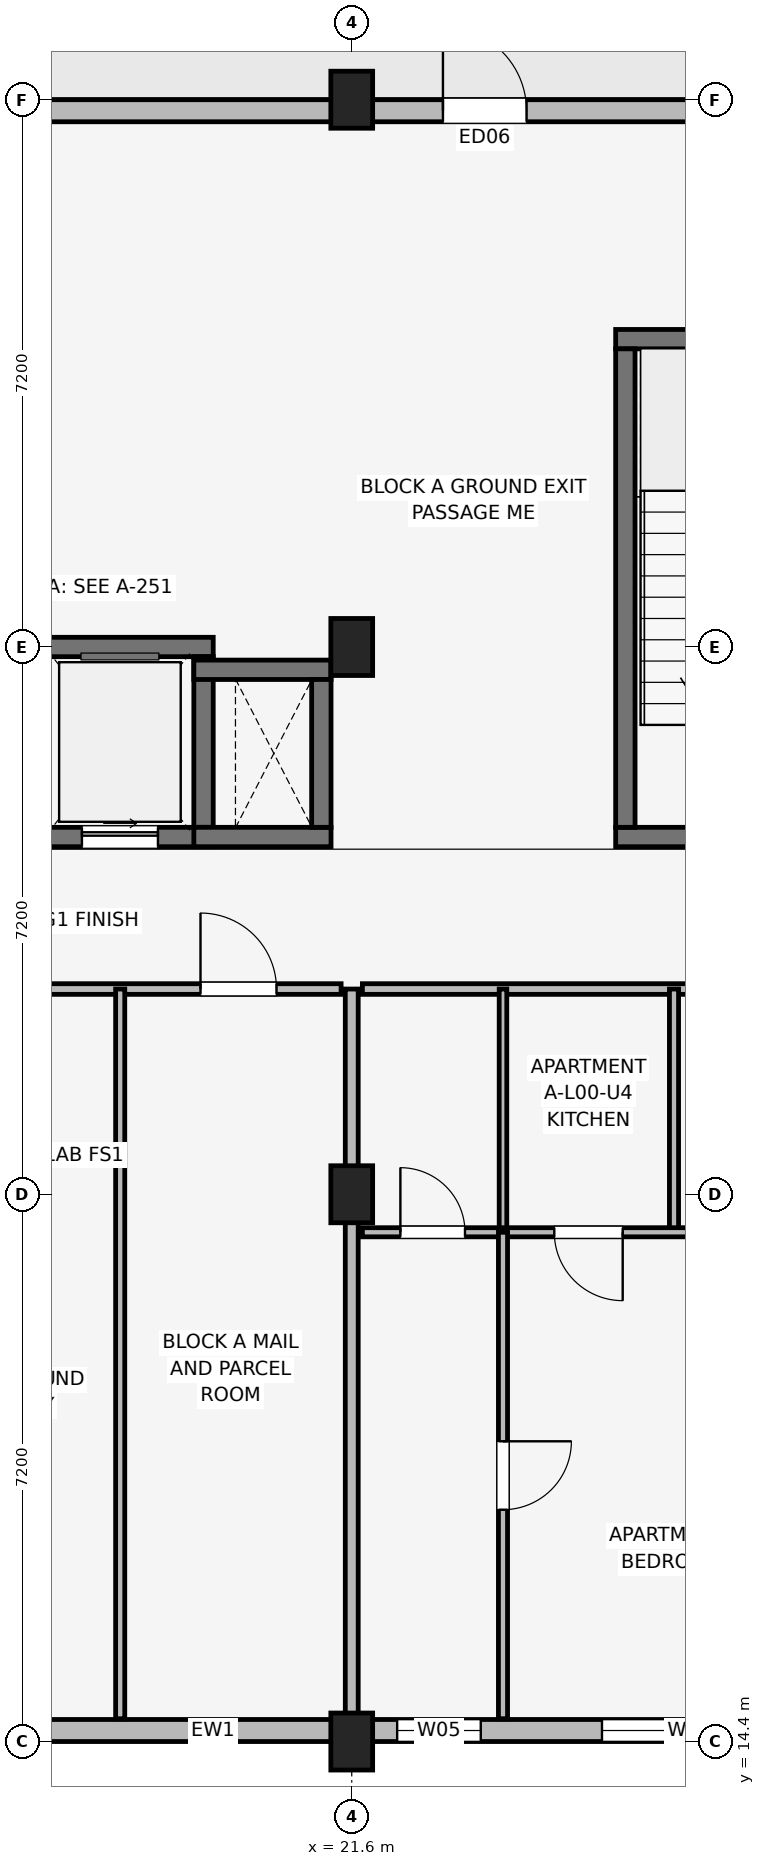
"""IFC4 building model, lengths in metres.
Left out: names, types, materials, properties, quantities, classifications, styles, units other than length and angle.
Written with IfcOpenShell. Run it as: python <this file> out.ifc"""

import sys

from ifc_helpers import new_model, si_unit, direction, frame, frame_2d, origin, origin_2d, place, context, subcontext, project, spatial, rectangle, extrude, element, fill, save


model = new_model("IFC4")
c1 = context("Model", 3, precision=1e-05, world=origin(), true_north=direction((0.0, 1.0)))
c2 = subcontext(c1, "Body", "Model", "MODEL_VIEW")
j1 = project(units=[si_unit("LENGTHUNIT", "METRE"), si_unit("PLANEANGLEUNIT", "RADIAN")], contexts=[c1])
p1 = place(None, origin())
s1 = spatial("IfcSite", under=j1, at=p1, CompositionType="ELEMENT")
p2 = place(p1, origin())
s2 = spatial("IfcBuilding", under=s1, at=p2, CompositionType="ELEMENT")
p3 = place(p2, origin())
s3 = spatial("IfcBuildingStorey", under=s2, at=p3, CompositionType="ELEMENT", Elevation=0.0)
for number, where, z_axis, x_axis in (
    (1, (21.6, 14.4, 0.0), (0.0, 0.0, 1.0), (1.0, 0.0, 0.0)),
    (2, (21.6, 21.6, 0.0), (0.0, 0.0, 1.0), (1.0, 0.0, 0.0)),
    (3, (21.6, 28.8, 0.0), (0.0, 0.0, 1.0), (1.0, 0.0, 0.0)),
    (4, (21.6, 36.0, 0.0), (0.0, 0.0, 1.0), (1.0, 0.0, 0.0)),
):
    element("IfcColumn", number, at=place(p3, frame(where, z_axis=z_axis, x_axis=x_axis)), inside=s3, PredefinedType="COLUMN", context=c2, shape_type="SweptSolid", body=[
        extrude(rectangle(XDim=0.55, YDim=0.75, at=origin_2d()), origin(), (0.0, 0.0, 1.0), 4.5),
    ])
p4 = place(p3, frame((25.073, 26.3, 0.0), z_axis=(0.0, 0.0, 1.0), x_axis=(1.0, 0.0, 0.0)))
e5 = element("IfcWall", 5, at=p4, inside=s3, PredefinedType="SHEAR", context=c2, shape_type="SweptSolid", body=[
    extrude(rectangle(XDim=3.305, YDim=0.255, at=frame_2d((1.652, 0.0))), origin(), (0.0, 0.0, 1.0), 4.5),
])
p5 = place(p4, frame((1.127, 0.0, 0.0)))
e6 = element("IfcOpeningElement", 6, at=p5, cuts=e5, PredefinedType="OPENING", context=c2, shape_type="SweptSolid", body=[
    extrude(rectangle(XDim=1.05, YDim=2.12, at=frame_2d((0.525, 1.06))), frame((0.0, 0.137, 0.0), z_axis=(0.0, -1.0, 0.0), x_axis=(1.0, 0.0, 0.0)), (0.0, 0.0, 1.0), 0.275),
])
p6 = place(p3, frame((25.073, 32.85, 0.0), z_axis=(0.0, 0.0, 1.0), x_axis=(1.0, 0.0, 0.0)))
e7 = element("IfcWall", 7, at=p6, inside=s3, PredefinedType="SHEAR", context=c2, shape_type="SweptSolid", body=[
    extrude(rectangle(XDim=3.305, YDim=0.255, at=frame_2d((1.652, 0.0))), origin(), (0.0, 0.0, 1.0), 4.5),
])
p7 = place(p3, frame((25.2, 26.427, 0.0), z_axis=(0.0, 0.0, 1.0), x_axis=(0.0, 1.0, 0.0)))
e8 = element("IfcWall", 8, at=p7, inside=s3, PredefinedType="SHEAR", context=c2, shape_type="SweptSolid", body=[
    extrude(rectangle(XDim=6.295, YDim=0.255, at=frame_2d((3.147, 0.0))), origin(), (0.0, 0.0, 1.0), 4.5),
])
p8 = place(p3, frame((17.323, 26.3, 0.0), z_axis=(0.0, 0.0, 1.0), x_axis=(1.0, 0.0, 0.0)))
e9 = element("IfcWall", 9, at=p8, inside=s3, PredefinedType="SHEAR", context=c2, shape_type="SweptSolid", body=[
    extrude(rectangle(XDim=2.455, YDim=0.255, at=frame_2d((1.228, 0.0))), origin(), (0.0, 0.0, 1.0), 4.5),
])
p9 = place(p8, frame((0.728, 0.0, 0.0)))
e10 = element("IfcOpeningElement", 10, at=p9, cuts=e9, PredefinedType="OPENING", context=c2, shape_type="SweptSolid", body=[
    extrude(rectangle(XDim=1.0, YDim=2.15, at=frame_2d((0.5, 1.075))), frame((0.0, 0.137, 0.0), z_axis=(0.0, -1.0, 0.0), x_axis=(1.0, 0.0, 0.0)), (0.0, 0.0, 1.0), 0.275),
])
p10 = place(p3, frame((17.323, 28.8, 0.0), z_axis=(0.0, 0.0, 1.0), x_axis=(1.0, 0.0, 0.0)))
e11 = element("IfcWall", 11, at=p10, inside=s3, PredefinedType="SHEAR", context=c2, shape_type="SweptSolid", body=[
    extrude(rectangle(XDim=2.455, YDim=0.255, at=frame_2d((1.228, 0.0))), origin(), (0.0, 0.0, 1.0), 4.5),
])
p11 = place(p3, frame((19.65, 26.427, 0.0), z_axis=(0.0, 0.0, 1.0), x_axis=(0.0, 1.0, 0.0)))
e12 = element("IfcWall", 12, at=p11, inside=s3, PredefinedType="SHEAR", context=c2, shape_type="SweptSolid", body=[
    extrude(rectangle(XDim=2.245, YDim=0.255, at=frame_2d((1.123, 0.0))), origin(), (0.0, 0.0, 1.0), 4.5),
])
for number, where, z_axis, x_axis in (
    (13, (19.522, 26.3, 0.0), (0.0, 0.0, 1.0), (1.0, 0.0, 0.0)),
    (14, (19.522, 28.5, 0.0), (0.0, 0.0, 1.0), (1.0, 0.0, 0.0)),
):
    element("IfcWall", number, at=place(p3, frame(where, z_axis=z_axis, x_axis=x_axis)), inside=s3, PredefinedType="SHEAR", context=c2, shape_type="SweptSolid", body=[
        extrude(rectangle(XDim=1.805, YDim=0.255, at=frame_2d((0.902, 0.0))), origin(), (0.0, 0.0, 1.0), 4.5),
    ])
p12 = place(p3, frame((21.2, 26.427, 0.0), z_axis=(0.0, 0.0, 1.0), x_axis=(0.0, 1.0, 0.0)))
e15 = element("IfcWall", 15, at=p12, inside=s3, PredefinedType="SHEAR", context=c2, shape_type="SweptSolid", body=[
    extrude(rectangle(XDim=1.945, YDim=0.255, at=frame_2d((0.973, 0.0))), origin(), (0.0, 0.0, 1.0), 4.5),
])
p13 = place(p3, frame((3.4, 14.545, 0.0), z_axis=(0.0, 0.0, 1.0), x_axis=(1.0, 0.0, 0.0)))
e16 = element("IfcWall", 16, at=p13, inside=s3, PredefinedType="SOLIDWALL", context=c2, shape_type="SweptSolid", body=[
    extrude(rectangle(XDim=29.2, YDim=0.29, at=frame_2d((14.6, 0.0))), origin(), (0.0, 0.0, 1.0), 3.53),
])
p14 = place(p13, frame((13.95, 0.0, 0.0), z_axis=(0.0, 0.0, 1.0), x_axis=(-1.0, 0.0, 0.0)))
e17 = element("IfcOpeningElement", 17, at=p14, cuts=e16, PredefinedType="OPENING", context=c2, shape_type="SweptSolid", body=[
    extrude(rectangle(XDim=1.8, YDim=2.4, at=frame_2d((0.9, 1.2))), frame((0.0, 0.155, 0.0), z_axis=(0.0, -1.0, 0.0), x_axis=(1.0, 0.0, 0.0)), (0.0, 0.0, 1.0), 0.31),
])
p15 = place(p13, frame((1.502, 0.0, 0.75)))
e18 = element("IfcOpeningElement", 18, at=p15, cuts=e16, PredefinedType="OPENING", context=c2, shape_type="SweptSolid", body=[
    extrude(rectangle(XDim=0.85, YDim=1.4, at=frame_2d((0.425, 0.7))), frame((0.0, 0.155, 0.0), z_axis=(0.0, -1.0, 0.0), x_axis=(1.0, 0.0, 0.0)), (0.0, 0.0, 1.0), 0.31),
])
p16 = place(p13, frame((6.4, 0.0, 0.7)))
e19 = element("IfcOpeningElement", 19, at=p16, cuts=e16, PredefinedType="OPENING", context=c2, shape_type="SweptSolid", body=[
    extrude(rectangle(XDim=2.0, YDim=1.65, at=frame_2d((1.0, 0.825))), frame((0.0, 0.155, 0.0), z_axis=(0.0, -1.0, 0.0), x_axis=(1.0, 0.0, 0.0)), (0.0, 0.0, 1.0), 0.31),
])
p17 = place(p13, frame((18.798, 0.0, 0.75)))
e20 = element("IfcOpeningElement", 20, at=p17, cuts=e16, PredefinedType="OPENING", context=c2, shape_type="SweptSolid", body=[
    extrude(rectangle(XDim=1.1, YDim=1.5, at=frame_2d((0.55, 0.75))), frame((0.0, 0.155, 0.0), z_axis=(0.0, -1.0, 0.0), x_axis=(1.0, 0.0, 0.0)), (0.0, 0.0, 1.0), 0.31),
])
p18 = place(p13, frame((21.492, 0.0, 0.7)))
e21 = element("IfcOpeningElement", 21, at=p18, cuts=e16, PredefinedType="OPENING", context=c2, shape_type="SweptSolid", body=[
    extrude(rectangle(XDim=2.3, YDim=1.65, at=frame_2d((1.15, 0.825))), frame((0.0, 0.155, 0.0), z_axis=(0.0, -1.0, 0.0), x_axis=(1.0, 0.0, 0.0)), (0.0, 0.0, 1.0), 0.31),
])
p19 = place(p13, frame((25.877, 0.0, 0.75)))
e22 = element("IfcOpeningElement", 22, at=p19, cuts=e16, PredefinedType="OPENING", context=c2, shape_type="SweptSolid", body=[
    extrude(rectangle(XDim=1.34, YDim=1.55, at=frame_2d((0.67, 0.775))), frame((0.0, 0.155, 0.0), z_axis=(0.0, -1.0, 0.0), x_axis=(1.0, 0.0, 0.0)), (0.0, 0.0, 1.0), 0.31),
])
p20 = place(p3, frame((32.6, 35.855, 0.0), z_axis=(0.0, 0.0, 1.0), x_axis=(-1.0, 0.0, 0.0)))
e23 = element("IfcWall", 23, at=p20, inside=s3, PredefinedType="SOLIDWALL", context=c2, shape_type="SweptSolid", body=[
    extrude(rectangle(XDim=29.2, YDim=0.29, at=frame_2d((14.6, 0.0))), origin(), (0.0, 0.0, 1.0), 3.53),
])
p21 = place(p20, frame((20.4, 0.0, 0.0), z_axis=(0.0, 0.0, 1.0), x_axis=(-1.0, 0.0, 0.0)))
e24 = element("IfcOpeningElement", 24, at=p21, cuts=e23, PredefinedType="OPENING", context=c2, shape_type="SweptSolid", body=[
    extrude(rectangle(XDim=1.1, YDim=2.15, at=frame_2d((0.55, 1.075))), frame((0.0, 0.155, 0.0), z_axis=(0.0, -1.0, 0.0), x_axis=(1.0, 0.0, 0.0)), (0.0, 0.0, 1.0), 0.31),
])
p22 = place(p20, frame((9.8, 0.0, 0.0), z_axis=(0.0, 0.0, 1.0), x_axis=(-1.0, 0.0, 0.0)))
e25 = element("IfcOpeningElement", 25, at=p22, cuts=e23, PredefinedType="OPENING", context=c2, shape_type="SweptSolid", body=[
    extrude(rectangle(XDim=1.1, YDim=2.15, at=frame_2d((0.55, 1.075))), frame((0.0, 0.155, 0.0), z_axis=(0.0, -1.0, 0.0), x_axis=(1.0, 0.0, 0.0)), (0.0, 0.0, 1.0), 0.31),
])
p23 = place(p20, frame((0.897, 0.0, 0.7)))
e26 = element("IfcOpeningElement", 26, at=p23, cuts=e23, PredefinedType="OPENING", context=c2, shape_type="SweptSolid", body=[
    extrude(rectangle(XDim=1.86, YDim=1.6, at=frame_2d((0.93, 0.8))), frame((0.0, 0.155, 0.0), z_axis=(0.0, -1.0, 0.0), x_axis=(1.0, 0.0, 0.0)), (0.0, 0.0, 1.0), 0.31),
])
p24 = place(p20, frame((26.373, 0.0, 0.7)))
e27 = element("IfcOpeningElement", 27, at=p24, cuts=e23, PredefinedType="OPENING", context=c2, shape_type="SweptSolid", body=[
    extrude(rectangle(XDim=2.0, YDim=1.65, at=frame_2d((1.0, 0.825))), frame((0.0, 0.155, 0.0), z_axis=(0.0, -1.0, 0.0), x_axis=(1.0, 0.0, 0.0)), (0.0, 0.0, 1.0), 0.31),
])
p25 = place(p3, frame((14.54, 24.3, 0.0), z_axis=(0.0, 0.0, 1.0), x_axis=(1.0, 0.0, 0.0)))
e28 = element("IfcWall", 28, at=p25, inside=s3, PredefinedType="PARTITIONING", context=c2, shape_type="SweptSolid", body=[
    extrude(rectangle(XDim=6.92, YDim=0.14, at=frame_2d((3.46, 0.0))), origin(), (0.0, 0.0, 1.0), 3.15),
])
p26 = place(p25, frame((2.65, 0.0, 0.0), z_axis=(0.0, 0.0, 1.0), x_axis=(-1.0, 0.0, 0.0)))
e29 = element("IfcOpeningElement", 29, at=p26, cuts=e28, PredefinedType="OPENING", context=c2, shape_type="SweptSolid", body=[
    extrude(rectangle(XDim=1.4, YDim=2.22, at=frame_2d((0.7, 1.11))), frame((0.0, 0.08, 0.0), z_axis=(0.0, -1.0, 0.0), x_axis=(1.0, 0.0, 0.0)), (0.0, 0.0, 1.0), 0.16),
])
p27 = place(p25, frame((5.07, 0.0, 0.0)))
e30 = element("IfcOpeningElement", 30, at=p27, cuts=e28, PredefinedType="OPENING", context=c2, shape_type="SweptSolid", body=[
    extrude(rectangle(XDim=1.0, YDim=2.12, at=frame_2d((0.5, 1.06))), frame((0.0, 0.08, 0.0), z_axis=(0.0, -1.0, 0.0), x_axis=(1.0, 0.0, 0.0)), (0.0, 0.0, 1.0), 0.16),
])
p28 = place(p3, frame((18.554, 14.7, 0.0), z_axis=(0.0, 0.0, 1.0), x_axis=(0.0, 1.0, 0.0)))
e31 = element("IfcWall", 31, at=p28, inside=s3, PredefinedType="PARTITIONING", context=c2, shape_type="SweptSolid", body=[
    extrude(rectangle(XDim=9.6, YDim=0.12, at=frame_2d((4.8, 0.0))), origin(), (0.0, 0.0, 1.0), 3.15),
])
p29 = place(p3, frame((21.6, 14.7, 0.0), z_axis=(0.0, 0.0, 1.0), x_axis=(0.0, 1.0, 0.0)))
e32 = element("IfcWall", 32, at=p29, inside=s3, PredefinedType="PARTITIONING", context=c2, shape_type="SweptSolid", body=[
    extrude(rectangle(XDim=9.6, YDim=0.17, at=frame_2d((4.8, 0.0))), origin(), (0.0, 0.0, 1.0), 3.15),
])
p30 = place(p3, frame((21.74, 24.3, 0.0), z_axis=(0.0, 0.0, 1.0), x_axis=(1.0, 0.0, 0.0)))
e33 = element("IfcWall", 33, at=p30, inside=s3, PredefinedType="PARTITIONING", context=c2, shape_type="SweptSolid", body=[
    extrude(rectangle(XDim=6.92, YDim=0.14, at=frame_2d((3.46, 0.0))), origin(), (0.0, 0.0, 1.0), 3.15),
])
p31 = place(p30, frame((6.0, 0.0, 0.0), z_axis=(0.0, 0.0, 1.0), x_axis=(-1.0, 0.0, 0.0)))
e34 = element("IfcOpeningElement", 34, at=p31, cuts=e33, PredefinedType="OPENING", context=c2, shape_type="SweptSolid", body=[
    extrude(rectangle(XDim=0.98, YDim=2.1, at=frame_2d((0.49, 1.05))), frame((0.0, 0.08, 0.0), z_axis=(0.0, -1.0, 0.0), x_axis=(1.0, 0.0, 0.0)), (0.0, 0.0, 1.0), 0.16),
])
p32 = place(p3, frame((23.59, 21.1, 0.0), z_axis=(0.0, 0.0, 1.0), x_axis=(0.0, 1.0, 0.0)))
e35 = element("IfcWall", 35, at=p32, inside=s3, PredefinedType="PARTITIONING", context=c2, shape_type="SweptSolid", body=[
    extrude(rectangle(XDim=3.2, YDim=0.1, at=frame_2d((1.6, 0.0))), origin(), (0.0, 0.0, 1.0), 3.15),
])
p33 = place(p3, frame((25.84, 21.1, 0.0), z_axis=(0.0, 0.0, 1.0), x_axis=(0.0, 1.0, 0.0)))
e36 = element("IfcWall", 36, at=p33, inside=s3, PredefinedType="PARTITIONING", context=c2, shape_type="SweptSolid", body=[
    extrude(rectangle(XDim=3.2, YDim=0.12, at=frame_2d((1.6, 0.0))), origin(), (0.0, 0.0, 1.0), 3.15),
])
p34 = place(p3, frame((21.74, 21.1, 0.0), z_axis=(0.0, 0.0, 1.0), x_axis=(1.0, 0.0, 0.0)))
e37 = element("IfcWall", 37, at=p34, inside=s3, PredefinedType="PARTITIONING", context=c2, shape_type="SweptSolid", body=[
    extrude(rectangle(XDim=6.92, YDim=0.12, at=frame_2d((3.46, 0.0))), origin(), (0.0, 0.0, 1.0), 3.15),
])
p35 = place(p34, frame((0.5, 0.0, 0.0)))
e38 = element("IfcOpeningElement", 38, at=p35, cuts=e37, PredefinedType="OPENING", context=c2, shape_type="SweptSolid", body=[
    extrude(rectangle(XDim=0.85, YDim=2.08, at=frame_2d((0.425, 1.04))), frame((0.0, 0.07, 0.0), z_axis=(0.0, -1.0, 0.0), x_axis=(1.0, 0.0, 0.0)), (0.0, 0.0, 1.0), 0.14),
])
p36 = place(p34, frame((3.425, 0.0, 0.0), z_axis=(0.0, 0.0, 1.0), x_axis=(-1.0, 0.0, 0.0)))
e39 = element("IfcOpeningElement", 39, at=p36, cuts=e37, PredefinedType="OPENING", context=c2, shape_type="SweptSolid", body=[
    extrude(rectangle(XDim=0.9, YDim=2.08, at=frame_2d((0.45, 1.04))), frame((0.0, 0.07, 0.0), z_axis=(0.0, -1.0, 0.0), x_axis=(1.0, 0.0, 0.0)), (0.0, 0.0, 1.0), 0.14),
])
p37 = place(p34, frame((5.035, 0.0, 0.0)))
e40 = element("IfcOpeningElement", 40, at=p37, cuts=e37, PredefinedType="OPENING", context=c2, shape_type="SweptSolid", body=[
    extrude(rectangle(XDim=0.95, YDim=2.08, at=frame_2d((0.475, 1.04))), frame((0.0, 0.07, 0.0), z_axis=(0.0, -1.0, 0.0), x_axis=(1.0, 0.0, 0.0)), (0.0, 0.0, 1.0), 0.14),
])
p38 = place(p3, frame((23.59, 14.7, 0.0), z_axis=(0.0, 0.0, 1.0), x_axis=(0.0, 1.0, 0.0)))
e41 = element("IfcWall", 41, at=p38, inside=s3, PredefinedType="PARTITIONING", context=c2, shape_type="SweptSolid", body=[
    extrude(rectangle(XDim=6.4, YDim=0.12, at=frame_2d((3.2, 0.0))), origin(), (0.0, 0.0, 1.0), 3.15),
])
p39 = place(p38, frame((3.65, 0.0, 0.0), z_axis=(0.0, 0.0, 1.0), x_axis=(-1.0, 0.0, 0.0)))
e42 = element("IfcOpeningElement", 42, at=p39, cuts=e41, PredefinedType="OPENING", context=c2, shape_type="SweptSolid", body=[
    extrude(rectangle(XDim=0.9, YDim=2.08, at=frame_2d((0.45, 1.04))), frame((0.0, 0.07, 0.0), z_axis=(0.0, -1.0, 0.0), x_axis=(1.0, 0.0, 0.0)), (0.0, 0.0, 1.0), 0.14),
])
p40 = place(p17, origin())
e43 = element("IfcWindow", 43, at=p40, inside=s3, PartitioningType="SINGLE_PANEL", PredefinedType="WINDOW", context=c2, shape_type="SweptSolid", body=[
    extrude(rectangle(XDim=1.1, YDim=1.5, at=frame_2d((0.55, 0.75))), frame((0.0, 0.03, 0.0), z_axis=(0.0, -1.0, 0.0), x_axis=(1.0, 0.0, 0.0)), (0.0, 0.0, 1.0), 0.06),
])
fill(e20, e43)
p41 = place(p18, origin())
e44 = element("IfcWindow", 44, at=p41, inside=s3, PartitioningType="SINGLE_PANEL", PredefinedType="WINDOW", context=c2, shape_type="SweptSolid", body=[
    extrude(rectangle(XDim=2.3, YDim=1.65, at=frame_2d((1.15, 0.825))), frame((0.0, 0.03, 0.0), z_axis=(0.0, -1.0, 0.0), x_axis=(1.0, 0.0, 0.0)), (0.0, 0.0, 1.0), 0.06),
])
fill(e21, e44)
p42 = place(p22, origin())
e45 = element("IfcDoor", 45, at=p42, inside=s3, OperationType="SINGLE_SWING_RIGHT", PredefinedType="DOOR", context=c2, shape_type="SweptSolid", body=[
    extrude(rectangle(XDim=1.1, YDim=2.15, at=frame_2d((0.55, 1.075))), frame((0.0, 0.025, 0.0), z_axis=(0.0, -1.0, 0.0), x_axis=(1.0, 0.0, 0.0)), (0.0, 0.0, 1.0), 0.05),
])
fill(e25, e45)
p43 = place(p27, origin())
e46 = element("IfcDoor", 46, at=p43, inside=s3, OperationType="SINGLE_SWING_LEFT", PredefinedType="DOOR", context=c2, shape_type="SweptSolid", body=[
    extrude(rectangle(XDim=1.0, YDim=2.12, at=frame_2d((0.5, 1.06))), frame((0.0, 0.025, 0.0), z_axis=(0.0, -1.0, 0.0), x_axis=(1.0, 0.0, 0.0)), (0.0, 0.0, 1.0), 0.05),
])
fill(e30, e46)
p44 = place(p35, origin())
e47 = element("IfcDoor", 47, at=p44, inside=s3, OperationType="SINGLE_SWING_LEFT", PredefinedType="DOOR", context=c2, shape_type="SweptSolid", body=[
    extrude(rectangle(XDim=0.85, YDim=2.08, at=frame_2d((0.425, 1.04))), frame((0.0, 0.025, 0.0), z_axis=(0.0, -1.0, 0.0), x_axis=(1.0, 0.0, 0.0)), (0.0, 0.0, 1.0), 0.05),
])
fill(e38, e47)
p45 = place(p36, origin())
e48 = element("IfcDoor", 48, at=p45, inside=s3, OperationType="SINGLE_SWING_RIGHT", PredefinedType="DOOR", context=c2, shape_type="SweptSolid", body=[
    extrude(rectangle(XDim=0.9, YDim=2.08, at=frame_2d((0.45, 1.04))), frame((0.0, 0.025, 0.0), z_axis=(0.0, -1.0, 0.0), x_axis=(1.0, 0.0, 0.0)), (0.0, 0.0, 1.0), 0.05),
])
fill(e39, e48)
p46 = place(p39, origin())
e49 = element("IfcDoor", 49, at=p46, inside=s3, OperationType="SINGLE_SWING_RIGHT", PredefinedType="DOOR", context=c2, shape_type="SweptSolid", body=[
    extrude(rectangle(XDim=0.9, YDim=2.08, at=frame_2d((0.45, 1.04))), frame((0.0, 0.025, 0.0), z_axis=(0.0, -1.0, 0.0), x_axis=(1.0, 0.0, 0.0)), (0.0, 0.0, 1.0), 0.05),
])
fill(e42, e49)
p47 = place(p9, origin())
e50 = element("IfcDoor", 50, at=p47, inside=s3, OperationType="SLIDING_TO_RIGHT", PredefinedType="DOOR", context=c2, shape_type="SweptSolid", body=[
    extrude(rectangle(XDim=1.0, YDim=2.15, at=frame_2d((0.5, 1.075))), frame((0.0, 0.025, 0.0), z_axis=(0.0, -1.0, 0.0), x_axis=(1.0, 0.0, 0.0)), (0.0, 0.0, 1.0), 0.05),
])
fill(e10, e50)
save(model, sys.argv[1])
